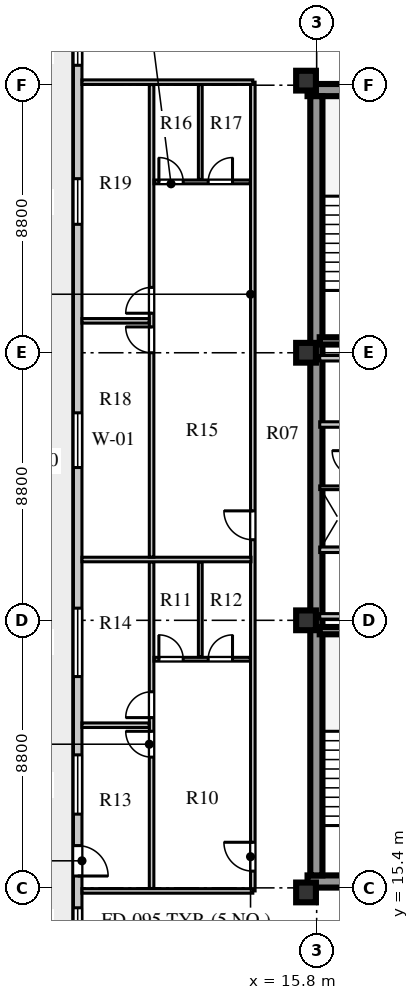
"""IFC4 building model, lengths in metres.
Left out: names, types, materials, properties, quantities, classifications, styles, units other than length and angle.
Written with IfcOpenShell. Run it as: python <this file> out.ifc"""

import sys

from ifc_helpers import new_model, si_unit, direction, frame, frame_2d, origin, origin_2d, place, context, subcontext, project, spatial, rectangle, extrude, element, fill, save


model = new_model("IFC4")
c1 = context("Model", 3, precision=1e-05, world=origin(), true_north=direction((0.0, 1.0)))
c2 = subcontext(c1, "Body", "Model", "MODEL_VIEW")
j1 = project(units=[si_unit("LENGTHUNIT", "METRE"), si_unit("PLANEANGLEUNIT", "RADIAN")], contexts=[c1])
p1 = place(None, origin())
s1 = spatial("IfcSite", under=j1, at=p1, CompositionType="ELEMENT")
p2 = place(p1, origin())
s2 = spatial("IfcBuilding", under=s1, at=p2, CompositionType="ELEMENT")
p3 = place(p2, frame((0.0, 0.0, 237.5)))
s3 = spatial("IfcBuildingStorey", under=s2, at=p3, CompositionType="ELEMENT", Elevation=237.5)
for number, where, z_axis, x_axis in (
    (1, (15.5, 15.61, 0.0), (0.0, 0.0, 1.0), (1.0, 0.0, 0.0)),
    (2, (15.5, 41.64, 0.0), (0.0, 0.0, 1.0), (1.0, 0.0, 0.0)),
):
    element("IfcWall", number, at=place(p3, frame(where, z_axis=z_axis, x_axis=x_axis)), inside=s3, PredefinedType="SHEAR", context=c2, shape_type="SweptSolid", body=[
        extrude(rectangle(XDim=9.48, YDim=0.4, at=frame_2d((4.74, 0.0))), origin(), (0.0, 0.0, 1.0), 3.66),
    ])
p4 = place(p3, frame((15.79, 15.81, 0.0), z_axis=(0.0, 0.0, 1.0), x_axis=(0.0, 1.0, 0.0)))
e3 = element("IfcWall", 3, at=p4, inside=s3, PredefinedType="SHEAR", context=c2, shape_type="SweptSolid", body=[
    extrude(rectangle(XDim=25.63, YDim=0.4, at=frame_2d((12.815, 0.0))), origin(), (0.0, 0.0, 1.0), 3.66),
])
for number, where, z_axis, x_axis in (
    (4, (15.45, 15.25, 0.0), (0.0, 0.0, 1.0), (1.0, 0.0, 0.0)),
    (5, (15.45, 24.2, 0.0), (0.0, 0.0, 1.0), (1.0, 0.0, 0.0)),
    (6, (15.45, 33.0, 0.0), (0.0, 0.0, 1.0), (1.0, 0.0, 0.0)),
    (7, (15.45, 41.95, 0.0), (0.0, 0.0, 1.0), (1.0, 0.0, 0.0)),
):
    element("IfcColumn", number, at=place(p3, frame(where, z_axis=z_axis, x_axis=x_axis)), inside=s3, PredefinedType="COLUMN", context=c2, shape_type="SweptSolid", body=[
        extrude(rectangle(XDim=0.65, YDim=0.65, at=origin_2d()), origin(), (0.0, 0.0, 1.0), 3.66),
    ])
p5 = place(p3, frame((7.94, 44.07, 0.0), z_axis=(0.0, 0.0, 1.0), x_axis=(0.0, -1.0, 0.0)))
e8 = element("IfcWall", 8, at=p5, inside=s3, PredefinedType="STANDARD", context=c2, shape_type="SweptSolid", body=[
    extrude(rectangle(XDim=30.94, YDim=0.28, at=frame_2d((15.47, 0.0))), origin(), (0.0, 0.0, 1.0), 3.66),
])
p6 = place(p5, frame((29.325, 0.0, 0.8)))
e9 = element("IfcOpeningElement", 9, at=p6, cuts=e8, PredefinedType="OPENING", context=c2, shape_type="SweptSolid", body=[
    extrude(rectangle(XDim=0.95, YDim=1.65, at=frame_2d((0.475, 0.825))), frame((0.0, 0.15, 0.0), z_axis=(0.0, -1.0, 0.0), x_axis=(1.0, 0.0, 0.0)), (0.0, 0.0, 1.0), 0.3),
])
p7 = place(p5, frame((27.28, 0.0, 0.0)))
e10 = element("IfcOpeningElement", 10, at=p7, cuts=e8, PredefinedType="OPENING", context=c2, shape_type="SweptSolid", body=[
    extrude(rectangle(XDim=1.0, YDim=2.05, at=frame_2d((0.5, 1.025))), frame((0.0, 0.15, 0.0), z_axis=(0.0, -1.0, 0.0), x_axis=(1.0, 0.0, 0.0)), (0.0, 0.0, 1.0), 0.3),
])
p8 = place(p5, frame((24.295, 0.0, 0.8)))
e11 = element("IfcOpeningElement", 11, at=p8, cuts=e8, PredefinedType="OPENING", context=c2, shape_type="SweptSolid", body=[
    extrude(rectangle(XDim=1.95, YDim=2.0, at=frame_2d((0.975, 1.0))), frame((0.0, 0.15, 0.0), z_axis=(0.0, -1.0, 0.0), x_axis=(1.0, 0.0, 0.0)), (0.0, 0.0, 1.0), 0.3),
])
p9 = place(p5, frame((19.47, 0.0, 0.8)))
e12 = element("IfcOpeningElement", 12, at=p9, cuts=e8, PredefinedType="OPENING", context=c2, shape_type="SweptSolid", body=[
    extrude(rectangle(XDim=2.25, YDim=2.0, at=frame_2d((1.125, 1.0))), frame((0.0, 0.15, 0.0), z_axis=(0.0, -1.0, 0.0), x_axis=(1.0, 0.0, 0.0)), (0.0, 0.0, 1.0), 0.3),
])
p10 = place(p5, frame((13.045, 0.0, 0.8)))
e13 = element("IfcOpeningElement", 13, at=p10, cuts=e8, PredefinedType="OPENING", context=c2, shape_type="SweptSolid", body=[
    extrude(rectangle(XDim=1.8, YDim=2.0, at=frame_2d((0.9, 1.0))), frame((0.0, 0.15, 0.0), z_axis=(0.0, -1.0, 0.0), x_axis=(1.0, 0.0, 0.0)), (0.0, 0.0, 1.0), 0.3),
])
p11 = place(p5, frame((5.345, 0.0, 0.8)))
e14 = element("IfcOpeningElement", 14, at=p11, cuts=e8, PredefinedType="OPENING", context=c2, shape_type="SweptSolid", body=[
    extrude(rectangle(XDim=1.5, YDim=2.0, at=frame_2d((0.75, 1.0))), frame((0.0, 0.15, 0.0), z_axis=(0.0, -1.0, 0.0), x_axis=(1.0, 0.0, 0.0)), (0.0, 0.0, 1.0), 0.3),
])
p12 = place(p5, frame((0.665, 0.0, 0.8)))
e15 = element("IfcOpeningElement", 15, at=p12, cuts=e8, PredefinedType="OPENING", context=c2, shape_type="SweptSolid", body=[
    extrude(rectangle(XDim=0.95, YDim=1.65, at=frame_2d((0.475, 0.825))), frame((0.0, 0.15, 0.0), z_axis=(0.0, -1.0, 0.0), x_axis=(1.0, 0.0, 0.0)), (0.0, 0.0, 1.0), 0.3),
])
p13 = place(p3, frame((15.9, 23.86, 0.0), z_axis=(0.0, 0.0, 1.0), x_axis=(1.0, 0.0, 0.0)))
e16 = element("IfcWall", 16, at=p13, inside=s3, PredefinedType="SHEAR", context=c2, shape_type="SweptSolid", body=[
    extrude(rectangle(XDim=3.52, YDim=0.24, at=frame_2d((1.76, 0.0))), origin(), (0.0, 0.0, 1.0), 3.9),
])
p14 = place(p3, frame((15.9, 26.52, 0.0), z_axis=(0.0, 0.0, 1.0), x_axis=(1.0, 0.0, 0.0)))
e17 = element("IfcWall", 17, at=p14, inside=s3, PredefinedType="SOLIDWALL", context=c2, shape_type="SweptSolid", body=[
    extrude(rectangle(XDim=8.68, YDim=0.18, at=frame_2d((4.34, 0.0))), origin(), (0.0, 0.0, 1.0), 3.66),
])
p15 = place(p14, frame((2.5, 0.0, 0.0)))
e18 = element("IfcOpeningElement", 18, at=p15, cuts=e17, PredefinedType="OPENING", context=c2, shape_type="SweptSolid", body=[
    extrude(rectangle(XDim=0.95, YDim=2.1, at=frame_2d((0.475, 1.05))), frame((0.0, 0.1, 0.0), z_axis=(0.0, -1.0, 0.0), x_axis=(1.0, 0.0, 0.0)), (0.0, 0.0, 1.0), 0.2),
])
p16 = place(p14, frame((6.0, 0.0, 0.0)))
e19 = element("IfcOpeningElement", 19, at=p16, cuts=e17, PredefinedType="OPENING", context=c2, shape_type="SweptSolid", body=[
    extrude(rectangle(XDim=0.95, YDim=2.1, at=frame_2d((0.475, 1.05))), frame((0.0, 0.1, 0.0), z_axis=(0.0, -1.0, 0.0), x_axis=(1.0, 0.0, 0.0)), (0.0, 0.0, 1.0), 0.2),
])
p17 = place(p3, frame((15.9, 24.33, 0.0), z_axis=(0.0, 0.0, 1.0), x_axis=(1.0, 0.0, 0.0)))
e20 = element("IfcWall", 20, at=p17, inside=s3, PredefinedType="SOLIDWALL", context=c2, shape_type="SweptSolid", body=[
    extrude(rectangle(XDim=8.68, YDim=0.18, at=frame_2d((4.34, 0.0))), origin(), (0.0, 0.0, 1.0), 3.06),
])
p18 = place(p3, frame((15.9, 28.56, 0.0), z_axis=(0.0, 0.0, 1.0), x_axis=(1.0, 0.0, 0.0)))
e21 = element("IfcWall", 21, at=p18, inside=s3, PredefinedType="PARTITIONING", context=c2, shape_type="SweptSolid", body=[
    extrude(rectangle(XDim=1.2, YDim=0.12, at=frame_2d((0.6, 0.0))), origin(), (0.0, 0.0, 1.0), 3.66),
])
p19 = place(p3, frame((15.9, 30.64, 0.0), z_axis=(0.0, 0.0, 1.0), x_axis=(1.0, 0.0, 0.0)))
e22 = element("IfcWall", 22, at=p19, inside=s3, PredefinedType="SOLIDWALL", context=c2, shape_type="SweptSolid", body=[
    extrude(rectangle(XDim=8.68, YDim=0.18, at=frame_2d((4.34, 0.0))), origin(), (0.0, 0.0, 1.0), 3.66),
])
p20 = place(p19, frame((3.7, 0.0, 0.0)))
e23 = element("IfcOpeningElement", 23, at=p20, cuts=e22, PredefinedType="OPENING", context=c2, shape_type="SweptSolid", body=[
    extrude(rectangle(XDim=0.95, YDim=2.1, at=frame_2d((0.475, 1.05))), frame((0.0, 0.1, 0.0), z_axis=(0.0, -1.0, 0.0), x_axis=(1.0, 0.0, 0.0)), (0.0, 0.0, 1.0), 0.2),
])
p21 = place(p3, frame((15.9, 32.82, 0.0), z_axis=(0.0, 0.0, 1.0), x_axis=(1.0, 0.0, 0.0)))
e24 = element("IfcWall", 24, at=p21, inside=s3, PredefinedType="SOLIDWALL", context=c2, shape_type="SweptSolid", body=[
    extrude(rectangle(XDim=8.68, YDim=0.18, at=frame_2d((4.34, 0.0))), origin(), (0.0, 0.0, 1.0), 3.06),
])
p22 = place(p3, frame((15.9, 33.39, 0.0), z_axis=(0.0, 0.0, 1.0), x_axis=(1.0, 0.0, 0.0)))
e25 = element("IfcWall", 25, at=p22, inside=s3, PredefinedType="SHEAR", context=c2, shape_type="SweptSolid", body=[
    extrude(rectangle(XDim=3.52, YDim=0.24, at=frame_2d((1.76, 0.0))), origin(), (0.0, 0.0, 1.0), 3.9),
])
p23 = place(p3, frame((13.7, 15.3, 0.0), z_axis=(0.0, 0.0, 1.0), x_axis=(0.0, 1.0, 0.0)))
e26 = element("IfcWall", 26, at=p23, inside=s3, PredefinedType="PARTITIONING", context=c2, shape_type="SweptSolid", body=[
    extrude(rectangle(XDim=26.6, YDim=0.15, at=frame_2d((13.3, 0.0))), origin(), (0.0, 0.0, 1.0), 3.66),
])
p24 = place(p23, frame((0.65, 0.0, 0.0)))
e27 = element("IfcOpeningElement", 27, at=p24, cuts=e26, PredefinedType="OPENING", context=c2, shape_type="SweptSolid", body=[
    extrude(rectangle(XDim=0.95, YDim=2.1, at=frame_2d((0.475, 1.05))), frame((0.0, 0.085, 0.0), z_axis=(0.0, -1.0, 0.0), x_axis=(1.0, 0.0, 0.0)), (0.0, 0.0, 1.0), 0.17),
])
p25 = place(p23, frame((11.55, 0.0, 0.0)))
e28 = element("IfcOpeningElement", 28, at=p25, cuts=e26, PredefinedType="OPENING", context=c2, shape_type="SweptSolid", body=[
    extrude(rectangle(XDim=0.95, YDim=2.1, at=frame_2d((0.475, 1.05))), frame((0.0, 0.085, 0.0), z_axis=(0.0, -1.0, 0.0), x_axis=(1.0, 0.0, 0.0)), (0.0, 0.0, 1.0), 0.17),
])
for number, where, z_axis, x_axis in (
    (29, (8.08, 15.3, 0.0), (0.0, 0.0, 1.0), (1.0, 0.0, 0.0)),
    (30, (8.08, 41.9, 0.0), (0.0, 0.0, 1.0), (1.0, 0.0, 0.0)),
):
    element("IfcWall", number, at=place(p3, frame(where, z_axis=z_axis, x_axis=x_axis)), inside=s3, PredefinedType="PARTITIONING", context=c2, shape_type="SweptSolid", body=[
        extrude(rectangle(XDim=5.62, YDim=0.15, at=frame_2d((2.81, 0.0))), origin(), (0.0, 0.0, 1.0), 3.21),
    ])
p26 = place(p3, frame((10.37, 15.38, 0.0), z_axis=(0.0, 0.0, 1.0), x_axis=(0.0, 1.0, 0.0)))
e31 = element("IfcWall", 31, at=p26, inside=s3, PredefinedType="PARTITIONING", context=c2, shape_type="SweptSolid", body=[
    extrude(rectangle(XDim=10.74, YDim=0.15, at=frame_2d((5.37, 0.0))), origin(), (0.0, 0.0, 1.0), 3.66),
])
p27 = place(p26, frame((4.32, 0.0, 0.0)))
e32 = element("IfcOpeningElement", 32, at=p27, cuts=e31, PredefinedType="OPENING", context=c2, shape_type="SweptSolid", body=[
    extrude(rectangle(XDim=0.85, YDim=2.08, at=frame_2d((0.425, 1.04))), frame((0.0, 0.085, 0.0), z_axis=(0.0, -1.0, 0.0), x_axis=(1.0, 0.0, 0.0)), (0.0, 0.0, 1.0), 0.17),
])
p28 = place(p26, frame((5.62, 0.0, 0.0)))
e33 = element("IfcOpeningElement", 33, at=p28, cuts=e31, PredefinedType="OPENING", context=c2, shape_type="SweptSolid", body=[
    extrude(rectangle(XDim=0.85, YDim=2.08, at=frame_2d((0.425, 1.04))), frame((0.0, 0.085, 0.0), z_axis=(0.0, -1.0, 0.0), x_axis=(1.0, 0.0, 0.0)), (0.0, 0.0, 1.0), 0.17),
])
p29 = place(p3, frame((10.45, 22.92, 0.0), z_axis=(0.0, 0.0, 1.0), x_axis=(1.0, 0.0, 0.0)))
e34 = element("IfcWall", 34, at=p29, inside=s3, PredefinedType="PLUMBINGWALL", context=c2, shape_type="SweptSolid", body=[
    extrude(rectangle(XDim=3.17, YDim=0.125, at=frame_2d((1.585, 0.0))), origin(), (0.0, 0.0, 1.0), 3.66),
])
p30 = place(p29, frame((0.16, 0.0, 0.0)))
e35 = element("IfcOpeningElement", 35, at=p30, cuts=e34, PredefinedType="OPENING", context=c2, shape_type="SweptSolid", body=[
    extrude(rectangle(XDim=0.8, YDim=2.05, at=frame_2d((0.4, 1.025))), frame((0.0, 0.073, 0.0), z_axis=(0.0, -1.0, 0.0), x_axis=(1.0, 0.0, 0.0)), (0.0, 0.0, 1.0), 0.145),
])
p31 = place(p29, frame((1.782, 0.0, 0.0)))
e36 = element("IfcOpeningElement", 36, at=p31, cuts=e34, PredefinedType="OPENING", context=c2, shape_type="SweptSolid", body=[
    extrude(rectangle(XDim=0.8, YDim=2.05, at=frame_2d((0.4, 1.025))), frame((0.0, 0.073, 0.0), z_axis=(0.0, -1.0, 0.0), x_axis=(1.0, 0.0, 0.0)), (0.0, 0.0, 1.0), 0.145),
])
p32 = place(p3, frame((11.972, 23.0, 0.0), z_axis=(0.0, 0.0, 1.0), x_axis=(0.0, 1.0, 0.0)))
e37 = element("IfcWall", 37, at=p32, inside=s3, PredefinedType="PLUMBINGWALL", context=c2, shape_type="SweptSolid", body=[
    extrude(rectangle(XDim=3.12, YDim=0.125, at=frame_2d((1.56, 0.0))), origin(), (0.0, 0.0, 1.0), 3.66),
])
p33 = place(p3, frame((8.08, 20.75, 0.0), z_axis=(0.0, 0.0, 1.0), x_axis=(1.0, 0.0, 0.0)))
e38 = element("IfcWall", 38, at=p33, inside=s3, PredefinedType="PARTITIONING", context=c2, shape_type="SweptSolid", body=[
    extrude(rectangle(XDim=2.21, YDim=0.15, at=frame_2d((1.105, 0.0))), origin(), (0.0, 0.0, 1.0), 3.66),
])
p34 = place(p3, frame((8.08, 26.2, 0.0), z_axis=(0.0, 0.0, 1.0), x_axis=(1.0, 0.0, 0.0)))
e39 = element("IfcWall", 39, at=p34, inside=s3, PredefinedType="PARTITIONING", context=c2, shape_type="SweptSolid", body=[
    extrude(rectangle(XDim=5.56, YDim=0.15, at=frame_2d((2.78, 0.0))), origin(), (0.0, 0.0, 1.0), 3.66),
])
p35 = place(p3, frame((10.37, 26.28, 0.0), z_axis=(0.0, 0.0, 1.0), x_axis=(0.0, 1.0, 0.0)))
e40 = element("IfcWall", 40, at=p35, inside=s3, PredefinedType="PARTITIONING", context=c2, shape_type="SweptSolid", body=[
    extrude(rectangle(XDim=15.54, YDim=0.15, at=frame_2d((7.77, 0.0))), origin(), (0.0, 0.0, 1.0), 3.66),
])
p36 = place(p35, frame((6.72, 0.0, 0.0)))
e41 = element("IfcOpeningElement", 41, at=p36, cuts=e40, PredefinedType="OPENING", context=c2, shape_type="SweptSolid", body=[
    extrude(rectangle(XDim=0.85, YDim=2.08, at=frame_2d((0.425, 1.04))), frame((0.0, 0.085, 0.0), z_axis=(0.0, -1.0, 0.0), x_axis=(1.0, 0.0, 0.0)), (0.0, 0.0, 1.0), 0.17),
])
p37 = place(p35, frame((8.02, 0.0, 0.0)))
e42 = element("IfcOpeningElement", 42, at=p37, cuts=e40, PredefinedType="OPENING", context=c2, shape_type="SweptSolid", body=[
    extrude(rectangle(XDim=0.85, YDim=2.08, at=frame_2d((0.425, 1.04))), frame((0.0, 0.085, 0.0), z_axis=(0.0, -1.0, 0.0), x_axis=(1.0, 0.0, 0.0)), (0.0, 0.0, 1.0), 0.17),
])
p38 = place(p3, frame((10.45, 38.62, 0.0), z_axis=(0.0, 0.0, 1.0), x_axis=(1.0, 0.0, 0.0)))
e43 = element("IfcWall", 43, at=p38, inside=s3, PredefinedType="PLUMBINGWALL", context=c2, shape_type="SweptSolid", body=[
    extrude(rectangle(XDim=3.17, YDim=0.125, at=frame_2d((1.585, 0.0))), origin(), (0.0, 0.0, 1.0), 3.66),
])
p39 = place(p38, frame((0.16, 0.0, 0.0)))
e44 = element("IfcOpeningElement", 44, at=p39, cuts=e43, PredefinedType="OPENING", context=c2, shape_type="SweptSolid", body=[
    extrude(rectangle(XDim=0.8, YDim=2.05, at=frame_2d((0.4, 1.025))), frame((0.0, 0.073, 0.0), z_axis=(0.0, -1.0, 0.0), x_axis=(1.0, 0.0, 0.0)), (0.0, 0.0, 1.0), 0.145),
])
p40 = place(p38, frame((1.782, 0.0, 0.0)))
e45 = element("IfcOpeningElement", 45, at=p40, cuts=e43, PredefinedType="OPENING", context=c2, shape_type="SweptSolid", body=[
    extrude(rectangle(XDim=0.8, YDim=2.05, at=frame_2d((0.4, 1.025))), frame((0.0, 0.073, 0.0), z_axis=(0.0, -1.0, 0.0), x_axis=(1.0, 0.0, 0.0)), (0.0, 0.0, 1.0), 0.145),
])
p41 = place(p3, frame((11.972, 38.7, 0.0), z_axis=(0.0, 0.0, 1.0), x_axis=(0.0, 1.0, 0.0)))
e46 = element("IfcWall", 46, at=p41, inside=s3, PredefinedType="PLUMBINGWALL", context=c2, shape_type="SweptSolid", body=[
    extrude(rectangle(XDim=3.12, YDim=0.125, at=frame_2d((1.56, 0.0))), origin(), (0.0, 0.0, 1.0), 3.66),
])
p42 = place(p3, frame((8.08, 34.05, 0.0), z_axis=(0.0, 0.0, 1.0), x_axis=(1.0, 0.0, 0.0)))
e47 = element("IfcWall", 47, at=p42, inside=s3, PredefinedType="PARTITIONING", context=c2, shape_type="SweptSolid", body=[
    extrude(rectangle(XDim=2.21, YDim=0.15, at=frame_2d((1.105, 0.0))), origin(), (0.0, 0.0, 1.0), 3.66),
])
p43 = place(p6, origin())
e48 = element("IfcWindow", 48, at=p43, inside=s3, PartitioningType="SINGLE_PANEL", PredefinedType="WINDOW", context=c2, shape_type="SweptSolid", body=[
    extrude(rectangle(XDim=0.95, YDim=1.65, at=frame_2d((0.475, 0.825))), frame((0.0, 0.03, 0.0), z_axis=(0.0, -1.0, 0.0), x_axis=(1.0, 0.0, 0.0)), (0.0, 0.0, 1.0), 0.06),
])
fill(e9, e48)
p44 = place(p7, frame((1.0, 0.0, 0.0), z_axis=(0.0, 0.0, 1.0), x_axis=(-1.0, 0.0, 0.0)))
e49 = element("IfcDoor", 49, at=p44, inside=s3, OperationType="SINGLE_SWING_LEFT", PredefinedType="DOOR", context=c2, shape_type="SweptSolid", body=[
    extrude(rectangle(XDim=1.0, YDim=2.05, at=frame_2d((0.5, 1.025))), frame((0.0, 0.025, 0.0), z_axis=(0.0, -1.0, 0.0), x_axis=(1.0, 0.0, 0.0)), (0.0, 0.0, 1.0), 0.05),
])
fill(e10, e49)
p45 = place(p8, origin())
e50 = element("IfcWindow", 50, at=p45, inside=s3, PartitioningType="SINGLE_PANEL", PredefinedType="WINDOW", context=c2, shape_type="SweptSolid", body=[
    extrude(rectangle(XDim=1.95, YDim=2.0, at=frame_2d((0.975, 1.0))), frame((0.0, 0.03, 0.0), z_axis=(0.0, -1.0, 0.0), x_axis=(1.0, 0.0, 0.0)), (0.0, 0.0, 1.0), 0.06),
])
fill(e11, e50)
p46 = place(p9, origin())
e51 = element("IfcWindow", 51, at=p46, inside=s3, PartitioningType="SINGLE_PANEL", PredefinedType="WINDOW", context=c2, shape_type="SweptSolid", body=[
    extrude(rectangle(XDim=2.25, YDim=2.0, at=frame_2d((1.125, 1.0))), frame((0.0, 0.03, 0.0), z_axis=(0.0, -1.0, 0.0), x_axis=(1.0, 0.0, 0.0)), (0.0, 0.0, 1.0), 0.06),
])
fill(e12, e51)
p47 = place(p10, origin())
e52 = element("IfcWindow", 52, at=p47, inside=s3, PartitioningType="SINGLE_PANEL", PredefinedType="WINDOW", context=c2, shape_type="SweptSolid", body=[
    extrude(rectangle(XDim=1.8, YDim=2.0, at=frame_2d((0.9, 1.0))), frame((0.0, 0.03, 0.0), z_axis=(0.0, -1.0, 0.0), x_axis=(1.0, 0.0, 0.0)), (0.0, 0.0, 1.0), 0.06),
])
fill(e13, e52)
p48 = place(p11, origin())
e53 = element("IfcWindow", 53, at=p48, inside=s3, PartitioningType="SINGLE_PANEL", PredefinedType="WINDOW", context=c2, shape_type="SweptSolid", body=[
    extrude(rectangle(XDim=1.5, YDim=2.0, at=frame_2d((0.75, 1.0))), frame((0.0, 0.03, 0.0), z_axis=(0.0, -1.0, 0.0), x_axis=(1.0, 0.0, 0.0)), (0.0, 0.0, 1.0), 0.06),
])
fill(e14, e53)
p49 = place(p12, origin())
e54 = element("IfcWindow", 54, at=p49, inside=s3, PartitioningType="SINGLE_PANEL", PredefinedType="WINDOW", context=c2, shape_type="SweptSolid", body=[
    extrude(rectangle(XDim=0.95, YDim=1.65, at=frame_2d((0.475, 0.825))), frame((0.0, 0.03, 0.0), z_axis=(0.0, -1.0, 0.0), x_axis=(1.0, 0.0, 0.0)), (0.0, 0.0, 1.0), 0.06),
])
fill(e15, e54)
p50 = place(p30, origin())
e55 = element("IfcDoor", 55, at=p50, inside=s3, OperationType="SINGLE_SWING_LEFT", PredefinedType="DOOR", context=c2, shape_type="SweptSolid", body=[
    extrude(rectangle(XDim=0.8, YDim=2.05, at=frame_2d((0.4, 1.025))), frame((0.0, 0.025, 0.0), z_axis=(0.0, -1.0, 0.0), x_axis=(1.0, 0.0, 0.0)), (0.0, 0.0, 1.0), 0.05),
])
fill(e35, e55)
p51 = place(p31, origin())
e56 = element("IfcDoor", 56, at=p51, inside=s3, OperationType="SINGLE_SWING_RIGHT", PredefinedType="DOOR", context=c2, shape_type="SweptSolid", body=[
    extrude(rectangle(XDim=0.8, YDim=2.05, at=frame_2d((0.4, 1.025))), frame((0.0, 0.025, 0.0), z_axis=(0.0, -1.0, 0.0), x_axis=(1.0, 0.0, 0.0)), (0.0, 0.0, 1.0), 0.05),
])
fill(e36, e56)
p52 = place(p27, frame((0.85, 0.0, 0.0), z_axis=(0.0, 0.0, 1.0), x_axis=(-1.0, 0.0, 0.0)))
e57 = element("IfcDoor", 57, at=p52, inside=s3, OperationType="SINGLE_SWING_LEFT", PredefinedType="DOOR", context=c2, shape_type="SweptSolid", body=[
    extrude(rectangle(XDim=0.85, YDim=2.08, at=frame_2d((0.425, 1.04))), frame((0.0, 0.025, 0.0), z_axis=(0.0, -1.0, 0.0), x_axis=(1.0, 0.0, 0.0)), (0.0, 0.0, 1.0), 0.05),
])
fill(e32, e57)
p53 = place(p28, frame((0.85, 0.0, 0.0), z_axis=(0.0, 0.0, 1.0), x_axis=(-1.0, 0.0, 0.0)))
e58 = element("IfcDoor", 58, at=p53, inside=s3, OperationType="SINGLE_SWING_RIGHT", PredefinedType="DOOR", context=c2, shape_type="SweptSolid", body=[
    extrude(rectangle(XDim=0.85, YDim=2.08, at=frame_2d((0.425, 1.04))), frame((0.0, 0.025, 0.0), z_axis=(0.0, -1.0, 0.0), x_axis=(1.0, 0.0, 0.0)), (0.0, 0.0, 1.0), 0.05),
])
fill(e33, e58)
p54 = place(p24, frame((0.95, 0.0, 0.0), z_axis=(0.0, 0.0, 1.0), x_axis=(-1.0, 0.0, 0.0)))
e59 = element("IfcDoor", 59, at=p54, inside=s3, OperationType="SINGLE_SWING_LEFT", PredefinedType="DOOR", context=c2, shape_type="SweptSolid", body=[
    extrude(rectangle(XDim=0.95, YDim=2.1, at=frame_2d((0.475, 1.05))), frame((0.0, 0.025, 0.0), z_axis=(0.0, -1.0, 0.0), x_axis=(1.0, 0.0, 0.0)), (0.0, 0.0, 1.0), 0.05),
])
fill(e27, e59)
p55 = place(p39, origin())
e60 = element("IfcDoor", 60, at=p55, inside=s3, OperationType="SINGLE_SWING_LEFT", PredefinedType="DOOR", context=c2, shape_type="SweptSolid", body=[
    extrude(rectangle(XDim=0.8, YDim=2.05, at=frame_2d((0.4, 1.025))), frame((0.0, 0.025, 0.0), z_axis=(0.0, -1.0, 0.0), x_axis=(1.0, 0.0, 0.0)), (0.0, 0.0, 1.0), 0.05),
])
fill(e44, e60)
p56 = place(p40, origin())
e61 = element("IfcDoor", 61, at=p56, inside=s3, OperationType="SINGLE_SWING_RIGHT", PredefinedType="DOOR", context=c2, shape_type="SweptSolid", body=[
    extrude(rectangle(XDim=0.8, YDim=2.05, at=frame_2d((0.4, 1.025))), frame((0.0, 0.025, 0.0), z_axis=(0.0, -1.0, 0.0), x_axis=(1.0, 0.0, 0.0)), (0.0, 0.0, 1.0), 0.05),
])
fill(e45, e61)
p57 = place(p36, frame((0.85, 0.0, 0.0), z_axis=(0.0, 0.0, 1.0), x_axis=(-1.0, 0.0, 0.0)))
e62 = element("IfcDoor", 62, at=p57, inside=s3, OperationType="SINGLE_SWING_LEFT", PredefinedType="DOOR", context=c2, shape_type="SweptSolid", body=[
    extrude(rectangle(XDim=0.85, YDim=2.08, at=frame_2d((0.425, 1.04))), frame((0.0, 0.025, 0.0), z_axis=(0.0, -1.0, 0.0), x_axis=(1.0, 0.0, 0.0)), (0.0, 0.0, 1.0), 0.05),
])
fill(e41, e62)
p58 = place(p37, frame((0.85, 0.0, 0.0), z_axis=(0.0, 0.0, 1.0), x_axis=(-1.0, 0.0, 0.0)))
e63 = element("IfcDoor", 63, at=p58, inside=s3, OperationType="SINGLE_SWING_RIGHT", PredefinedType="DOOR", context=c2, shape_type="SweptSolid", body=[
    extrude(rectangle(XDim=0.85, YDim=2.08, at=frame_2d((0.425, 1.04))), frame((0.0, 0.025, 0.0), z_axis=(0.0, -1.0, 0.0), x_axis=(1.0, 0.0, 0.0)), (0.0, 0.0, 1.0), 0.05),
])
fill(e42, e63)
p59 = place(p25, frame((0.95, 0.0, 0.0), z_axis=(0.0, 0.0, 1.0), x_axis=(-1.0, 0.0, 0.0)))
e64 = element("IfcDoor", 64, at=p59, inside=s3, OperationType="SINGLE_SWING_LEFT", PredefinedType="DOOR", context=c2, shape_type="SweptSolid", body=[
    extrude(rectangle(XDim=0.95, YDim=2.1, at=frame_2d((0.475, 1.05))), frame((0.0, 0.025, 0.0), z_axis=(0.0, -1.0, 0.0), x_axis=(1.0, 0.0, 0.0)), (0.0, 0.0, 1.0), 0.05),
])
fill(e28, e64)
save(model, sys.argv[1])
